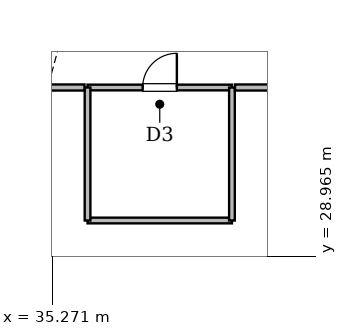
"""IFC4 building model, lengths in metres.
Left out: names, types, materials, properties, quantities, classifications, styles, units other than length and angle.
Written with IfcOpenShell. Run it as: python <this file> out.ifc"""

import sys

from ifc_helpers import new_model, si_unit, direction, frame, frame_2d, origin, place, context, subcontext, project, spatial, rectangle, extrude, element, fill, save


model = new_model("IFC4")
c1 = context("Model", 3, precision=1e-05, world=origin(), true_north=direction((0.0, 1.0)))
c2 = subcontext(c1, "Body", "Model", "MODEL_VIEW")
j1 = project(units=[si_unit("LENGTHUNIT", "METRE"), si_unit("PLANEANGLEUNIT", "RADIAN")], contexts=[c1])
p1 = place(None, origin())
s1 = spatial("IfcSite", under=j1, at=p1, CompositionType="ELEMENT")
p2 = place(p1, origin())
s2 = spatial("IfcBuilding", under=s1, at=p2, CompositionType="ELEMENT")
p3 = place(p2, frame((0.0, 0.0, 19.2)))
s3 = spatial("IfcBuildingStorey", under=s2, at=p3, CompositionType="ELEMENT", Elevation=19.2)
p4 = place(p3, frame((36.2, 33.4, 0.0), z_axis=(0.0, 0.0, 1.0), x_axis=(1.0, 0.0, 0.0)))
e1 = element("IfcWall", 1, at=p4, inside=s3, PredefinedType="PLUMBINGWALL", context=c2, shape_type="SweptSolid", body=[
    extrude(rectangle(XDim=3.8, YDim=0.15, at=frame_2d((1.9, 0.0))), origin(), (0.0, 0.0, 1.0), 3.638),
])
p5 = place(p4, frame((1.45, 0.0, 0.0)))
e2 = element("IfcOpeningElement", 2, at=p5, cuts=e1, PredefinedType="OPENING", context=c2, shape_type="SweptSolid", body=[
    extrude(rectangle(XDim=0.9, YDim=2.1, at=frame_2d((0.45, 1.05))), frame((0.0, 0.085, 0.0), z_axis=(0.0, -1.0, 0.0), x_axis=(1.0, 0.0, 0.0)), (0.0, 0.0, 1.0), 0.17),
])
p6 = place(p3, frame((36.2, 29.9, 0.0), z_axis=(0.0, 0.0, 1.0), x_axis=(1.0, 0.0, 0.0)))
e3 = element("IfcWall", 3, at=p6, inside=s3, PredefinedType="PLUMBINGWALL", context=c2, shape_type="SweptSolid", body=[
    extrude(rectangle(XDim=3.8, YDim=0.15, at=frame_2d((1.9, 0.0))), origin(), (0.0, 0.0, 1.0), 4.35),
])
for number, where, z_axis, x_axis in (
    (4, (36.2, 33.4, 0.0), (0.0, 0.0, 1.0), (0.0, -1.0, 0.0)),
    (5, (40.0, 29.9, 0.0), (0.0, 0.0, 1.0), (0.0, 1.0, 0.0)),
):
    element("IfcWall", number, at=place(p3, frame(where, z_axis=z_axis, x_axis=x_axis)), inside=s3, PredefinedType="PLUMBINGWALL", context=c2, shape_type="SweptSolid", body=[
        extrude(rectangle(XDim=3.5, YDim=0.15, at=frame_2d((1.75, 0.0))), origin(), (0.0, 0.0, 1.0), 3.638),
    ])
p7 = place(p3, frame((40.08, 33.4, 0.0), z_axis=(0.0, 0.0, 1.0), x_axis=(1.0, 0.0, 0.0)))
e6 = element("IfcWall", 6, at=p7, inside=s3, PredefinedType="SOLIDWALL", context=c2, shape_type="SweptSolid", body=[
    extrude(rectangle(XDim=2.84, YDim=0.16, at=frame_2d((1.42, 0.0))), origin(), (0.0, 0.0, 1.0), 4.35),
])
p8 = place(p3, frame((33.48, 33.4, 0.0), z_axis=(0.0, 0.0, 1.0), x_axis=(1.0, 0.0, 0.0)))
e7 = element("IfcWall", 7, at=p8, inside=s3, PredefinedType="SOLIDWALL", context=c2, shape_type="SweptSolid", body=[
    extrude(rectangle(XDim=2.64, YDim=0.16, at=frame_2d((1.32, 0.0))), origin(), (0.0, 0.0, 1.0), 3.638),
])
p9 = place(p5, origin())
e8 = element("IfcDoor", 8, at=p9, inside=s3, OperationType="SINGLE_SWING_RIGHT", PredefinedType="DOOR", context=c2, shape_type="SweptSolid", body=[
    extrude(rectangle(XDim=0.9, YDim=2.1, at=frame_2d((0.45, 1.05))), frame((0.0, 0.025, 0.0), z_axis=(0.0, -1.0, 0.0), x_axis=(1.0, 0.0, 0.0)), (0.0, 0.0, 1.0), 0.05),
])
fill(e2, e8)
save(model, sys.argv[1])
